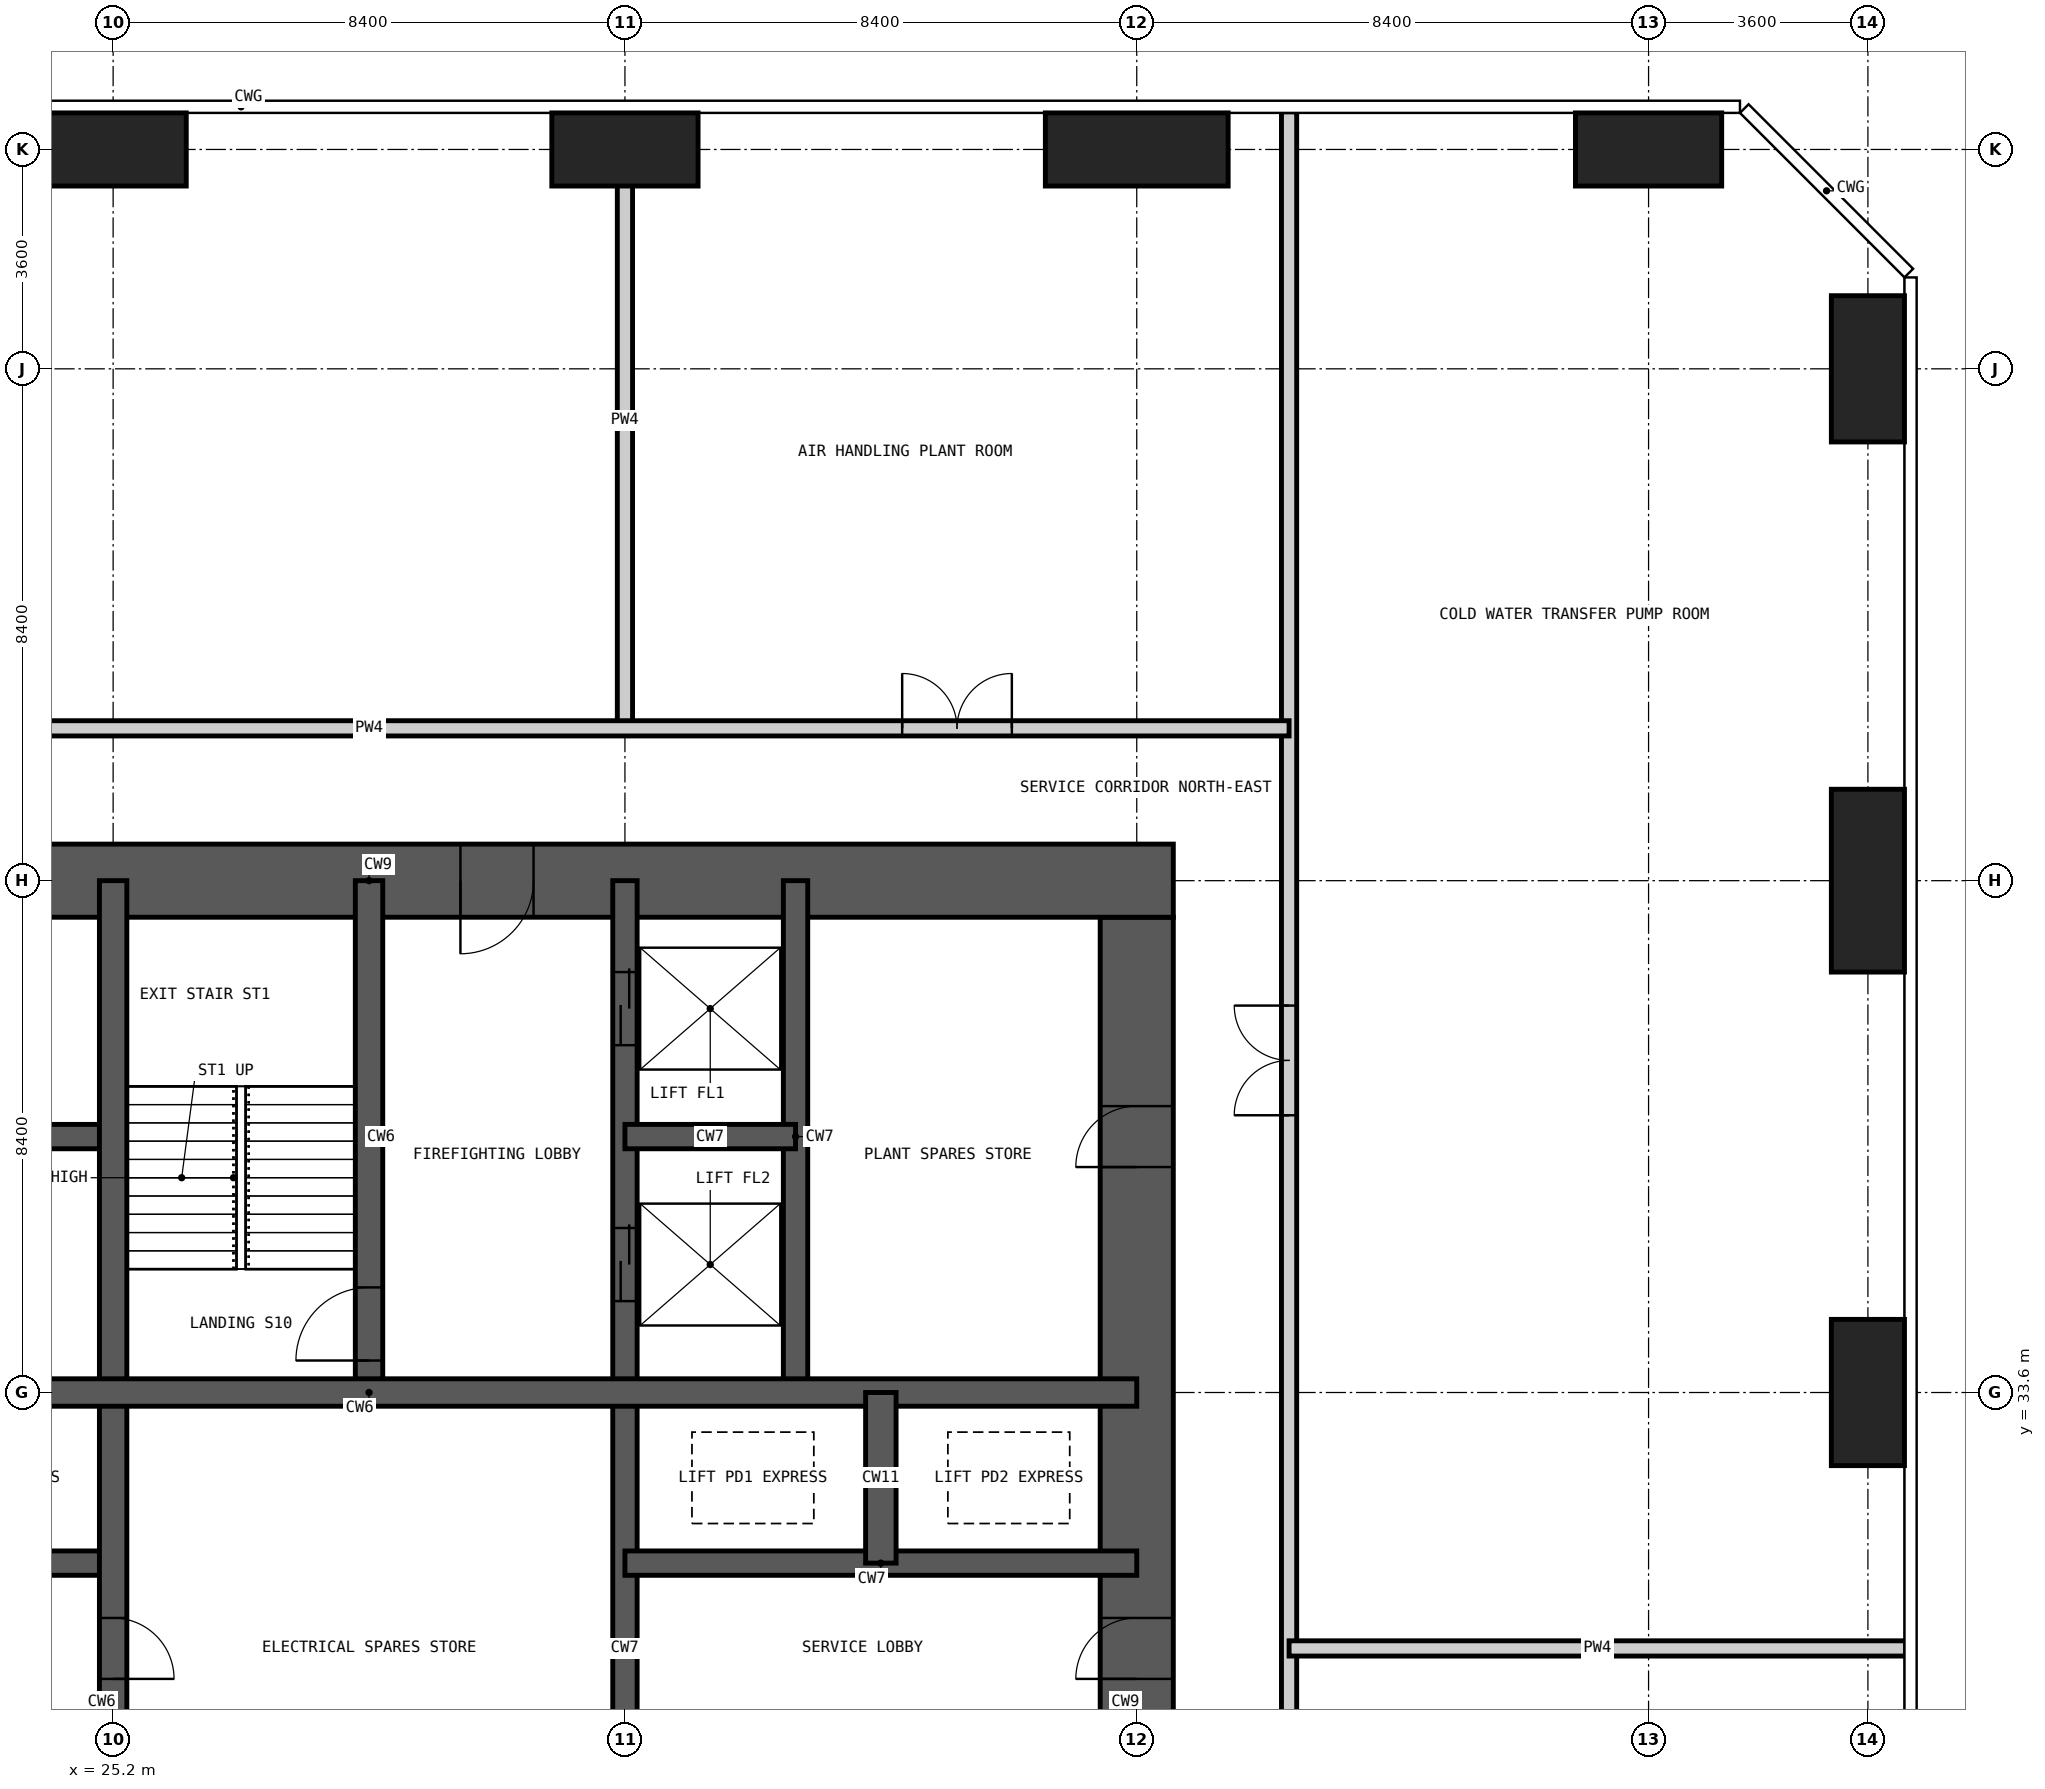
"""IFC4 building model, lengths in metres.
Left out: names, types, materials, properties, quantities, classifications, styles, units other than length and angle.
Written with IfcOpenShell. Run it as: python <this file> out.ifc"""

import sys

from ifc_helpers import new_model, si_unit, direction, frame, frame_2d, origin, origin_2d, place, context, subcontext, project, spatial, rectangle, extrude, element, fill, save


model = new_model("IFC4")
c1 = context("Model", 3, precision=1e-05, world=origin(), true_north=direction((0.0, 1.0)))
c2 = subcontext(c1, "Body", "Model", "MODEL_VIEW")
j1 = project(units=[si_unit("LENGTHUNIT", "METRE"), si_unit("PLANEANGLEUNIT", "RADIAN")], contexts=[c1])
p1 = place(None, origin())
s1 = spatial("IfcSite", under=j1, at=p1, CompositionType="ELEMENT")
p2 = place(p1, origin())
s2 = spatial("IfcBuilding", under=s1, at=p2, CompositionType="ELEMENT")
p3 = place(p2, frame((0.0, 0.0, 153.6)))
s3 = spatial("IfcBuildingStorey", under=s2, at=p3, CompositionType="ELEMENT", Elevation=153.6)
for number, where, z_axis, x_axis in (
    (1, (25.2, 54.0, -0.4), (0.0, 0.0, 1.0), (1.0, 0.0, 0.0)),
    (2, (33.6, 54.0, -0.4), (0.0, 0.0, 1.0), (1.0, 0.0, 0.0)),
):
    element("IfcColumn", number, at=place(p3, frame(where, z_axis=z_axis, x_axis=x_axis)), inside=s3, PredefinedType="COLUMN", context=c2, shape_type="SweptSolid", body=[
        extrude(rectangle(XDim=2.4, YDim=1.2, at=origin_2d()), origin(), (0.0, 0.0, 1.0), 5.45),
    ])
p4 = place(p3, frame((42.0, 54.0, -0.4), z_axis=(0.0, 0.0, 1.0), x_axis=(1.0, 0.0, 0.0)))
e3 = element("IfcColumn", 3, at=p4, inside=s3, PredefinedType="COLUMN", context=c2, shape_type="SweptSolid", body=[
    extrude(rectangle(XDim=3.0, YDim=1.2, at=origin_2d()), origin(), (0.0, 0.0, 1.0), 5.45),
])
p5 = place(p3, frame((50.4, 54.0, -0.4), z_axis=(0.0, 0.0, 1.0), x_axis=(1.0, 0.0, 0.0)))
e4 = element("IfcColumn", 4, at=p5, inside=s3, PredefinedType="COLUMN", context=c2, shape_type="SweptSolid", body=[
    extrude(rectangle(XDim=2.4, YDim=1.2, at=origin_2d()), origin(), (0.0, 0.0, 1.0), 5.45),
])
p6 = place(p3, frame((54.0, 33.6, -0.4), z_axis=(0.0, 0.0, 1.0), x_axis=(1.0, 0.0, 0.0)))
e5 = element("IfcColumn", 5, at=p6, inside=s3, PredefinedType="COLUMN", context=c2, shape_type="SweptSolid", body=[
    extrude(rectangle(XDim=1.2, YDim=2.4, at=origin_2d()), origin(), (0.0, 0.0, 1.0), 5.45),
])
p7 = place(p3, frame((54.0, 42.0, -0.4), z_axis=(0.0, 0.0, 1.0), x_axis=(1.0, 0.0, 0.0)))
e6 = element("IfcColumn", 6, at=p7, inside=s3, PredefinedType="COLUMN", context=c2, shape_type="SweptSolid", body=[
    extrude(rectangle(XDim=1.2, YDim=3.0, at=origin_2d()), origin(), (0.0, 0.0, 1.0), 5.45),
])
p8 = place(p3, frame((54.0, 50.4, -0.4), z_axis=(0.0, 0.0, 1.0), x_axis=(1.0, 0.0, 0.0)))
e7 = element("IfcColumn", 7, at=p8, inside=s3, PredefinedType="COLUMN", context=c2, shape_type="SweptSolid", body=[
    extrude(rectangle(XDim=1.2, YDim=2.4, at=origin_2d()), origin(), (0.0, 0.0, 1.0), 5.45),
])
p9 = place(p3, frame((42.0, 17.4, -0.4), z_axis=(0.0, 0.0, 1.0), x_axis=(0.0, 1.0, 0.0)))
e8 = element("IfcWall", 8, at=p9, inside=s3, PredefinedType="SHEAR", context=c2, shape_type="SweptSolid", body=[
    extrude(rectangle(XDim=24.0, YDim=1.2, at=frame_2d((12.0, 0.0))), origin(), (0.0, 0.0, 1.0), 5.45),
])
p10 = place(p9, frame((0.2, 0.0, 0.4)))
e9 = element("IfcOpeningElement", 9, at=p10, cuts=e8, PredefinedType="OPENING", context=c2, shape_type="SweptSolid", body=[
    extrude(rectangle(XDim=1.2, YDim=2.2, at=frame_2d((0.6, 1.1))), frame((0.0, 0.61, 0.0), z_axis=(0.0, -1.0, 0.0), x_axis=(1.0, 0.0, 0.0)), (0.0, 0.0, 1.0), 1.22),
])
p11 = place(p9, frame((11.5, 0.0, 0.4)))
e10 = element("IfcOpeningElement", 10, at=p11, cuts=e8, PredefinedType="OPENING", context=c2, shape_type="SweptSolid", body=[
    extrude(rectangle(XDim=1.0, YDim=2.1, at=frame_2d((0.5, 1.05))), frame((0.0, 0.61, 0.0), z_axis=(0.0, -1.0, 0.0), x_axis=(1.0, 0.0, 0.0)), (0.0, 0.0, 1.0), 1.22),
])
p12 = place(p9, frame((19.9, 0.0, 0.4)))
e11 = element("IfcOpeningElement", 11, at=p12, cuts=e8, PredefinedType="OPENING", context=c2, shape_type="SweptSolid", body=[
    extrude(rectangle(XDim=1.0, YDim=2.1, at=frame_2d((0.5, 1.05))), frame((0.0, 0.61, 0.0), z_axis=(0.0, -1.0, 0.0), x_axis=(1.0, 0.0, 0.0)), (0.0, 0.0, 1.0), 1.22),
])
p13 = place(p3, frame((42.6, 42.0, -0.4), z_axis=(0.0, 0.0, 1.0), x_axis=(-1.0, 0.0, 0.0)))
e12 = element("IfcWall", 12, at=p13, inside=s3, PredefinedType="SHEAR", context=c2, shape_type="SweptSolid", body=[
    extrude(rectangle(XDim=26.4, YDim=1.2, at=frame_2d((13.2, 0.0))), origin(), (0.0, 0.0, 1.0), 5.45),
])
p14 = place(p13, frame((21.1, 0.0, 0.4)))
e13 = element("IfcOpeningElement", 13, at=p14, cuts=e12, PredefinedType="OPENING", context=c2, shape_type="SweptSolid", body=[
    extrude(rectangle(XDim=1.0, YDim=2.1, at=frame_2d((0.5, 1.05))), frame((0.0, 0.61, 0.0), z_axis=(0.0, -1.0, 0.0), x_axis=(1.0, 0.0, 0.0)), (0.0, 0.0, 1.0), 1.22),
])
p15 = place(p13, frame((10.5, 0.0, 0.4)))
e14 = element("IfcOpeningElement", 14, at=p15, cuts=e12, PredefinedType="OPENING", context=c2, shape_type="SweptSolid", body=[
    extrude(rectangle(XDim=1.2, YDim=2.2, at=frame_2d((0.6, 1.1))), frame((0.0, 0.61, 0.0), z_axis=(0.0, -1.0, 0.0), x_axis=(1.0, 0.0, 0.0)), (0.0, 0.0, 1.0), 1.22),
])
p16 = place(p3, frame((33.6, 16.8, -0.4), z_axis=(0.0, 0.0, 1.0), x_axis=(0.0, 1.0, 0.0)))
e15 = element("IfcWall", 15, at=p16, inside=s3, PredefinedType="SHEAR", context=c2, shape_type="SweptSolid", body=[
    extrude(rectangle(XDim=25.2, YDim=0.4, at=frame_2d((12.6, 0.0))), origin(), (0.0, 0.0, 1.0), 5.45),
])
p17 = place(p16, frame((22.5, 0.0, 0.4)))
e16 = element("IfcOpeningElement", 16, at=p17, cuts=e15, PredefinedType="OPENING", context=c2, shape_type="SweptSolid", body=[
    extrude(rectangle(XDim=1.2, YDim=2.2, at=frame_2d((0.6, 1.1))), frame((0.0, 0.21, 0.0), z_axis=(0.0, -1.0, 0.0), x_axis=(1.0, 0.0, 0.0)), (0.0, 0.0, 1.0), 0.42),
])
p18 = place(p16, frame((18.3, 0.0, 0.4)))
e17 = element("IfcOpeningElement", 17, at=p18, cuts=e15, PredefinedType="OPENING", context=c2, shape_type="SweptSolid", body=[
    extrude(rectangle(XDim=1.2, YDim=2.2, at=frame_2d((0.6, 1.1))), frame((0.0, 0.21, 0.0), z_axis=(0.0, -1.0, 0.0), x_axis=(1.0, 0.0, 0.0)), (0.0, 0.0, 1.0), 0.42),
])
for number, where, z_axis, x_axis in (
    (18, (36.4, 33.6, -0.4), (0.0, 0.0, 1.0), (0.0, 1.0, 0.0)),
    (19, (16.8, 30.8, -0.4), (0.0, 0.0, 1.0), (1.0, 0.0, 0.0)),
    (20, (33.6, 30.8, -0.4), (0.0, 0.0, 1.0), (1.0, 0.0, 0.0)),
    (21, (16.8, 37.8, -0.4), (0.0, 0.0, 1.0), (1.0, 0.0, 0.0)),
):
    element("IfcWall", number, at=place(p3, frame(where, z_axis=z_axis, x_axis=x_axis)), inside=s3, PredefinedType="SHEAR", context=c2, shape_type="SweptSolid", body=[
        extrude(rectangle(XDim=8.4, YDim=0.4, at=frame_2d((4.2, 0.0))), origin(), (0.0, 0.0, 1.0), 5.45),
    ])
p19 = place(p3, frame((33.6, 37.8, -0.4), z_axis=(0.0, 0.0, 1.0), x_axis=(1.0, 0.0, 0.0)))
e22 = element("IfcWall", 22, at=p19, inside=s3, PredefinedType="SHEAR", context=c2, shape_type="SweptSolid", body=[
    extrude(rectangle(XDim=2.8, YDim=0.4, at=frame_2d((1.4, 0.0))), origin(), (0.0, 0.0, 1.0), 5.45),
])
p20 = place(p3, frame((25.2, 16.8, -0.4), z_axis=(0.0, 0.0, 1.0), x_axis=(0.0, 1.0, 0.0)))
e23 = element("IfcWall", 23, at=p20, inside=s3, PredefinedType="SHEAR", context=c2, shape_type="SweptSolid", body=[
    extrude(rectangle(XDim=25.2, YDim=0.45, at=frame_2d((12.6, 0.0))), origin(), (0.0, 0.0, 1.0), 5.45),
])
p21 = place(p20, frame((12.1, 0.0, 0.4)))
e24 = element("IfcOpeningElement", 24, at=p21, cuts=e23, PredefinedType="OPENING", context=c2, shape_type="SweptSolid", body=[
    extrude(rectangle(XDim=1.0, YDim=2.1, at=frame_2d((0.5, 1.05))), frame((0.0, 0.235, 0.0), z_axis=(0.0, -1.0, 0.0), x_axis=(1.0, 0.0, 0.0)), (0.0, 0.0, 1.0), 0.47),
])
p22 = place(p3, frame((29.4, 33.6, -0.4), z_axis=(0.0, 0.0, 1.0), x_axis=(0.0, 1.0, 0.0)))
e25 = element("IfcWall", 25, at=p22, inside=s3, PredefinedType="SHEAR", context=c2, shape_type="SweptSolid", body=[
    extrude(rectangle(XDim=8.4, YDim=0.45, at=frame_2d((4.2, 0.0))), origin(), (0.0, 0.0, 1.0), 5.45),
])
p23 = place(p22, frame((0.525, 0.0, 0.4)))
e26 = element("IfcOpeningElement", 26, at=p23, cuts=e25, PredefinedType="OPENING", context=c2, shape_type="SweptSolid", body=[
    extrude(rectangle(XDim=1.2, YDim=2.2, at=frame_2d((0.6, 1.1))), frame((0.0, 0.235, 0.0), z_axis=(0.0, -1.0, 0.0), x_axis=(1.0, 0.0, 0.0)), (0.0, 0.0, 1.0), 0.47),
])
p24 = place(p3, frame((16.8, 33.6, -0.4), z_axis=(0.0, 0.0, 1.0), x_axis=(1.0, 0.0, 0.0)))
e27 = element("IfcWall", 27, at=p24, inside=s3, PredefinedType="SHEAR", context=c2, shape_type="SweptSolid", body=[
    extrude(rectangle(XDim=25.2, YDim=0.45, at=frame_2d((12.6, 0.0))), origin(), (0.0, 0.0, 1.0), 5.45),
])
p25 = place(p3, frame((37.8, 30.8, -0.4), z_axis=(0.0, 0.0, 1.0), x_axis=(0.0, 1.0, 0.0)))
e28 = element("IfcWall", 28, at=p25, inside=s3, PredefinedType="SHEAR", context=c2, shape_type="SweptSolid", body=[
    extrude(rectangle(XDim=2.8, YDim=0.5, at=frame_2d((1.4, 0.0))), origin(), (0.0, 0.0, 1.0), 5.45),
])
p26 = place(p3, frame((33.6, 44.5, 0.0), z_axis=(0.0, 0.0, 1.0), x_axis=(0.0, 1.0, 0.0)))
e29 = element("IfcWall", 29, at=p26, inside=s3, PredefinedType="PARTITIONING", context=c2, shape_type="SweptSolid", body=[
    extrude(rectangle(XDim=10.118, YDim=0.25, at=frame_2d((5.059, 0.0))), origin(), (0.0, 0.0, 1.0), 5.05),
])
p27 = place(p3, frame((44.5, -0.018, 0.0), z_axis=(0.0, 0.0, 1.0), x_axis=(0.0, 1.0, 0.0)))
e30 = element("IfcWall", 30, at=p27, inside=s3, PredefinedType="PARTITIONING", context=c2, shape_type="SweptSolid", body=[
    extrude(rectangle(XDim=54.636, YDim=0.25, at=frame_2d((27.318, 0.0))), origin(), (0.0, 0.0, 1.0), 5.05),
])
p28 = place(p27, frame((20.968, 0.0, 0.0)))
e31 = element("IfcOpeningElement", 31, at=p28, cuts=e30, PredefinedType="OPENING", context=c2, shape_type="SweptSolid", body=[
    extrude(rectangle(XDim=1.8, YDim=2.4, at=frame_2d((0.9, 1.2))), frame((0.0, 0.135, 0.0), z_axis=(0.0, -1.0, 0.0), x_axis=(1.0, 0.0, 0.0)), (0.0, 0.0, 1.0), 0.27),
])
p29 = place(p27, frame((38.168, 0.0, 0.0)))
e32 = element("IfcOpeningElement", 32, at=p29, cuts=e30, PredefinedType="OPENING", context=c2, shape_type="SweptSolid", body=[
    extrude(rectangle(XDim=1.8, YDim=2.4, at=frame_2d((0.9, 1.2))), frame((0.0, 0.135, 0.0), z_axis=(0.0, -1.0, 0.0), x_axis=(1.0, 0.0, 0.0)), (0.0, 0.0, 1.0), 0.27),
])
p30 = place(p3, frame((44.5, 29.4, 0.0), z_axis=(0.0, 0.0, 1.0), x_axis=(1.0, 0.0, 0.0)))
e33 = element("IfcWall", 33, at=p30, inside=s3, PredefinedType="PARTITIONING", context=c2, shape_type="SweptSolid", body=[
    extrude(rectangle(XDim=10.118, YDim=0.25, at=frame_2d((5.059, 0.0))), origin(), (0.0, 0.0, 1.0), 5.05),
])
p31 = place(p3, frame((14.3, 44.5, 0.0), z_axis=(0.0, 0.0, 1.0), x_axis=(1.0, 0.0, 0.0)))
e34 = element("IfcWall", 34, at=p31, inside=s3, PredefinedType="PARTITIONING", context=c2, shape_type="SweptSolid", body=[
    extrude(rectangle(XDim=30.2, YDim=0.25, at=frame_2d((15.1, 0.0))), origin(), (0.0, 0.0, 1.0), 5.05),
])
p32 = place(p31, frame((4.55, 0.0, 0.0)))
e35 = element("IfcOpeningElement", 35, at=p32, cuts=e34, PredefinedType="OPENING", context=c2, shape_type="SweptSolid", body=[
    extrude(rectangle(XDim=1.8, YDim=2.4, at=frame_2d((0.9, 1.2))), frame((0.0, 0.135, 0.0), z_axis=(0.0, -1.0, 0.0), x_axis=(1.0, 0.0, 0.0)), (0.0, 0.0, 1.0), 0.27),
])
p33 = place(p31, frame((23.85, 0.0, 0.0)))
e36 = element("IfcOpeningElement", 36, at=p33, cuts=e34, PredefinedType="OPENING", context=c2, shape_type="SweptSolid", body=[
    extrude(rectangle(XDim=1.8, YDim=2.4, at=frame_2d((0.9, 1.2))), frame((0.0, 0.135, 0.0), z_axis=(0.0, -1.0, 0.0), x_axis=(1.0, 0.0, 0.0)), (0.0, 0.0, 1.0), 0.27),
])
p34 = place(p23, origin())
e37 = element("IfcDoor", 37, at=p34, inside=s3, OperationType="SINGLE_SWING_LEFT", PredefinedType="DOOR", context=c2, shape_type="SweptSolid", body=[
    extrude(rectangle(XDim=1.2, YDim=2.2, at=frame_2d((0.6, 1.1))), frame((0.0, 0.025, 0.0), z_axis=(0.0, -1.0, 0.0), x_axis=(1.0, 0.0, 0.0)), (0.0, 0.0, 1.0), 0.05),
])
fill(e26, e37)
p35 = place(p17, origin())
e38 = element("IfcDoor", 38, at=p35, inside=s3, OperationType="DOUBLE_DOOR_SLIDING", PredefinedType="DOOR", context=c2, shape_type="SweptSolid", body=[
    extrude(rectangle(XDim=1.2, YDim=2.2, at=frame_2d((0.6, 1.1))), frame((0.0, 0.025, 0.0), z_axis=(0.0, -1.0, 0.0), x_axis=(1.0, 0.0, 0.0)), (0.0, 0.0, 1.0), 0.05),
])
fill(e16, e38)
p36 = place(p18, origin())
e39 = element("IfcDoor", 39, at=p36, inside=s3, OperationType="DOUBLE_DOOR_SLIDING", PredefinedType="DOOR", context=c2, shape_type="SweptSolid", body=[
    extrude(rectangle(XDim=1.2, YDim=2.2, at=frame_2d((0.6, 1.1))), frame((0.0, 0.025, 0.0), z_axis=(0.0, -1.0, 0.0), x_axis=(1.0, 0.0, 0.0)), (0.0, 0.0, 1.0), 0.05),
])
fill(e17, e39)
p37 = place(p29, origin())
e40 = element("IfcDoor", 40, at=p37, inside=s3, OperationType="DOUBLE_DOOR_DOUBLE_SWING", PredefinedType="DOOR", context=c2, shape_type="SweptSolid", body=[
    extrude(rectangle(XDim=1.8, YDim=2.4, at=frame_2d((0.9, 1.2))), frame((0.0, 0.025, 0.0), z_axis=(0.0, -1.0, 0.0), x_axis=(1.0, 0.0, 0.0)), (0.0, 0.0, 1.0), 0.05),
])
fill(e32, e40)
p38 = place(p33, origin())
e41 = element("IfcDoor", 41, at=p38, inside=s3, OperationType="DOUBLE_DOOR_DOUBLE_SWING", PredefinedType="DOOR", context=c2, shape_type="SweptSolid", body=[
    extrude(rectangle(XDim=1.8, YDim=2.4, at=frame_2d((0.9, 1.2))), frame((0.0, 0.025, 0.0), z_axis=(0.0, -1.0, 0.0), x_axis=(1.0, 0.0, 0.0)), (0.0, 0.0, 1.0), 0.05),
])
fill(e36, e41)
p39 = place(p21, frame((1.0, 0.0, 0.0), z_axis=(0.0, 0.0, 1.0), x_axis=(-1.0, 0.0, 0.0)))
e42 = element("IfcDoor", 42, at=p39, inside=s3, OperationType="SINGLE_SWING_RIGHT", PredefinedType="DOOR", context=c2, shape_type="SweptSolid", body=[
    extrude(rectangle(XDim=1.0, YDim=2.1, at=frame_2d((0.5, 1.05))), frame((0.0, 0.025, 0.0), z_axis=(0.0, -1.0, 0.0), x_axis=(1.0, 0.0, 0.0)), (0.0, 0.0, 1.0), 0.05),
])
fill(e24, e42)
p40 = place(p11, origin())
e43 = element("IfcDoor", 43, at=p40, inside=s3, OperationType="SINGLE_SWING_LEFT", PredefinedType="DOOR", context=c2, shape_type="SweptSolid", body=[
    extrude(rectangle(XDim=1.0, YDim=2.1, at=frame_2d((0.5, 1.05))), frame((0.0, 0.025, 0.0), z_axis=(0.0, -1.0, 0.0), x_axis=(1.0, 0.0, 0.0)), (0.0, 0.0, 1.0), 0.05),
])
fill(e10, e43)
p41 = place(p15, origin())
e44 = element("IfcDoor", 44, at=p41, inside=s3, OperationType="SINGLE_SWING_RIGHT", PredefinedType="DOOR", context=c2, shape_type="SweptSolid", body=[
    extrude(rectangle(XDim=1.2, YDim=2.2, at=frame_2d((0.6, 1.1))), frame((0.0, 0.025, 0.0), z_axis=(0.0, -1.0, 0.0), x_axis=(1.0, 0.0, 0.0)), (0.0, 0.0, 1.0), 0.05),
])
fill(e14, e44)
p42 = place(p12, origin())
e45 = element("IfcDoor", 45, at=p42, inside=s3, OperationType="SINGLE_SWING_LEFT", PredefinedType="DOOR", context=c2, shape_type="SweptSolid", body=[
    extrude(rectangle(XDim=1.0, YDim=2.1, at=frame_2d((0.5, 1.05))), frame((0.0, 0.025, 0.0), z_axis=(0.0, -1.0, 0.0), x_axis=(1.0, 0.0, 0.0)), (0.0, 0.0, 1.0), 0.05),
])
fill(e11, e45)
save(model, sys.argv[1])
